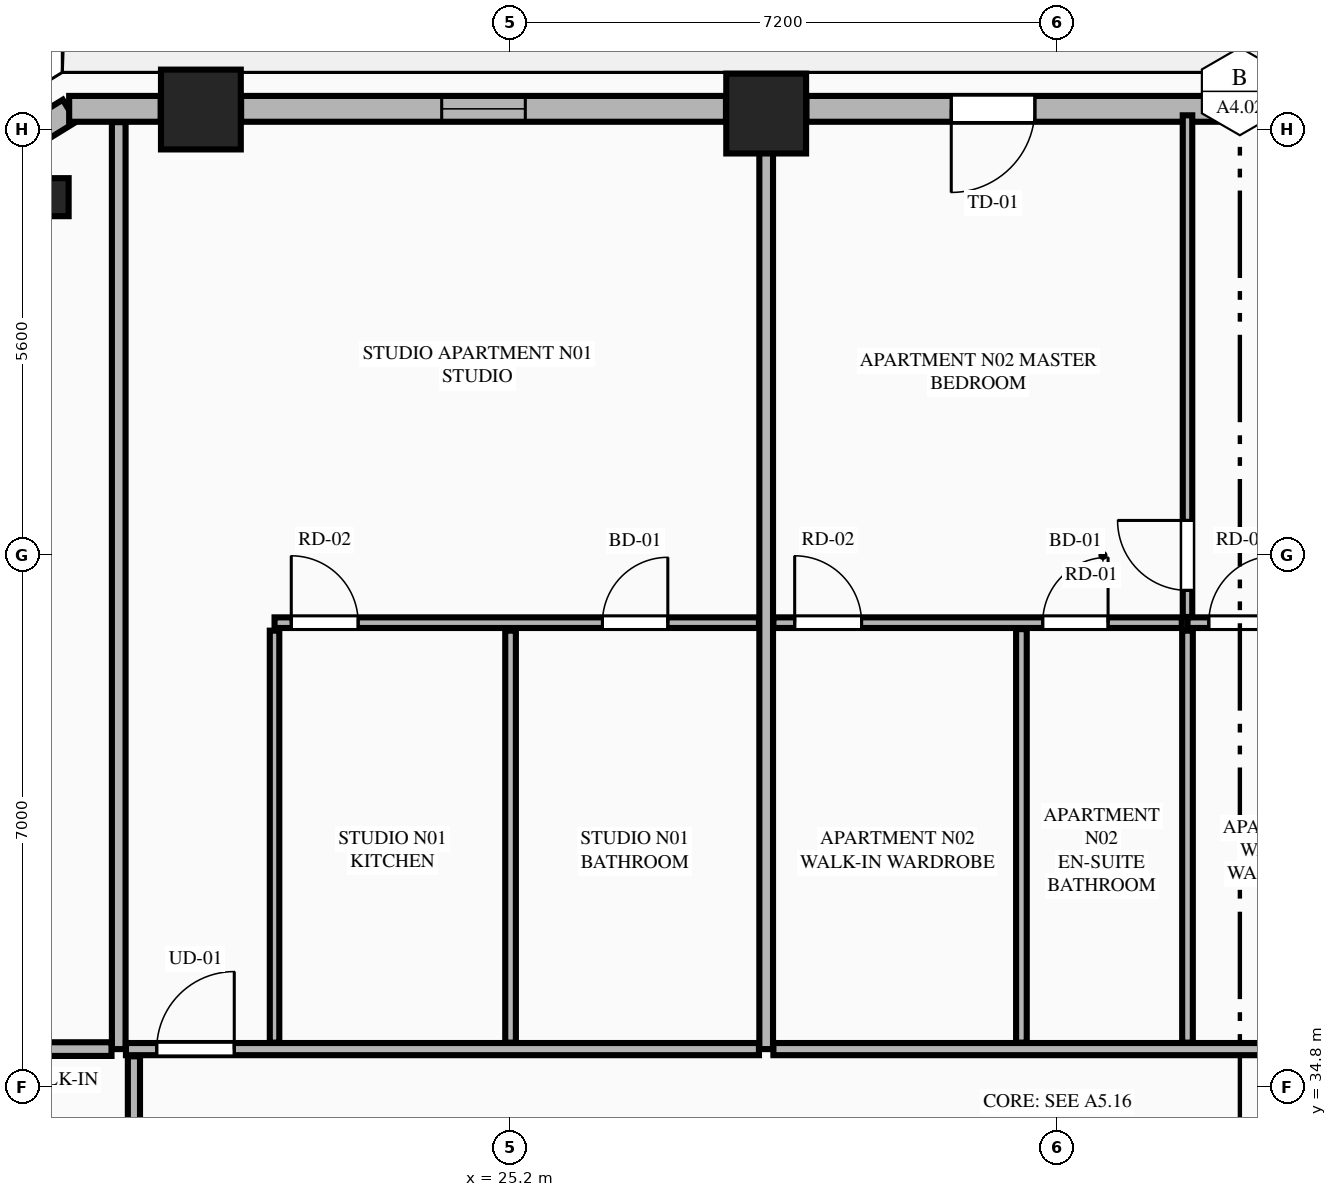
"""IFC4 building model, lengths in metres.
Left out: names, types, materials, properties, quantities, classifications, styles, units other than length and angle.
Written with IfcOpenShell. Run it as: python <this file> out.ifc"""

import sys

from ifc_helpers import new_model, si_unit, direction, frame, frame_2d, origin, origin_2d, place, context, subcontext, project, spatial, rectangle, extrude, element, fill, save


model = new_model("IFC4")
c1 = context("Model", 3, precision=1e-05, world=origin(), true_north=direction((0.0, 1.0)))
c2 = subcontext(c1, "Body", "Model", "MODEL_VIEW")
j1 = project(units=[si_unit("LENGTHUNIT", "METRE"), si_unit("PLANEANGLEUNIT", "RADIAN")], contexts=[c1])
p1 = place(None, origin())
s1 = spatial("IfcSite", under=j1, at=p1, CompositionType="ELEMENT")
p2 = place(p1, origin())
s2 = spatial("IfcBuilding", under=s1, at=p2, CompositionType="ELEMENT")
p3 = place(p2, frame((0.0, 0.0, 109.05)))
s3 = spatial("IfcBuildingStorey", under=s2, at=p3, CompositionType="ELEMENT", Elevation=109.05)
for number, where, z_axis, x_axis in (
    (1, (28.568, 47.608, 0.0), (0.0, 0.0, 1.0), (1.0, 0.0, 0.0)),
    (2, (21.131, 47.661, 0.0), (0.0, 0.0, 1.0), (1.0, 0.0, 0.0)),
):
    element("IfcColumn", number, at=place(p3, frame(where, z_axis=z_axis, x_axis=x_axis)), inside=s3, PredefinedType="COLUMN", context=c2, shape_type="SweptSolid", body=[
        extrude(rectangle(XDim=1.05, YDim=1.05, at=origin_2d()), origin(), (0.0, 0.0, 1.0), 3.55),
    ])
p4 = place(p3, frame((19.141, 46.508, 0.0), z_axis=(0.0, 0.0, 1.0), x_axis=(-0.865160173452, -0.501495637342, 0.0)))
e3 = element("IfcColumn", 3, at=p4, inside=s3, PredefinedType="PILASTER", context=c2, shape_type="SweptSolid", body=[
    extrude(rectangle(XDim=0.5, YDim=0.35, at=origin_2d()), origin(), (0.0, 0.0, 1.0), 3.55),
])
p5 = place(p3, frame((19.403, 47.645, 0.0), z_axis=(0.0, 0.0, 1.0), x_axis=(-0.851798915137, -0.523868884523, 0.0)))
e4 = element("IfcWall", 4, at=p5, inside=s3, PredefinedType="STANDARD", context=c2, shape_type="SweptSolid", body=[
    extrude(rectangle(XDim=1.848, YDim=0.34, at=frame_2d((0.924, 0.0))), origin(), (0.0, 0.0, 1.0), 3.34),
])
p6 = place(p3, frame((35.703, 47.67, 0.0), z_axis=(0.0, 0.0, 1.0), x_axis=(-1.0, 0.0, 0.0)))
e5 = element("IfcWall", 5, at=p6, inside=s3, PredefinedType="STANDARD", context=c2, shape_type="SweptSolid", body=[
    extrude(rectangle(XDim=6.606, YDim=0.34, at=frame_2d((3.303, 0.0))), origin(), (0.0, 0.0, 1.0), 2.797),
])
p7 = place(p6, frame((3.6, 0.0, 0.0)))
e6 = element("IfcOpeningElement", 6, at=p7, cuts=e5, PredefinedType="OPENING", context=c2, shape_type="SweptSolid", body=[
    extrude(rectangle(XDim=1.1, YDim=2.25, at=frame_2d((0.55, 1.125))), frame((0.0, 0.18, 0.0), z_axis=(0.0, -1.0, 0.0), x_axis=(1.0, 0.0, 0.0)), (0.0, 0.0, 1.0), 0.36),
])
p8 = place(p6, frame((0.22, 0.0, 0.75)))
e7 = element("IfcOpeningElement", 7, at=p8, cuts=e5, PredefinedType="OPENING", context=c2, shape_type="SweptSolid", body=[
    extrude(rectangle(XDim=1.04, YDim=1.897, at=frame_2d((0.52, 0.948))), frame((0.0, 0.18, 0.0), z_axis=(0.0, -1.0, 0.0), x_axis=(1.0, 0.0, 0.0)), (0.0, 0.0, 1.0), 0.36),
])
p9 = place(p3, frame((28.039, 47.67, 0.0), z_axis=(0.0, 0.0, 1.0), x_axis=(-1.0, 0.0, 0.0)))
e8 = element("IfcWall", 8, at=p9, inside=s3, PredefinedType="STANDARD", context=c2, shape_type="SweptSolid", body=[
    extrude(rectangle(XDim=6.379, YDim=0.34, at=frame_2d((3.189, 0.0))), origin(), (0.0, 0.0, 1.0), 2.797),
])
p10 = place(p9, frame((2.64, 0.0, 0.75)))
e9 = element("IfcOpeningElement", 9, at=p10, cuts=e8, PredefinedType="OPENING", context=c2, shape_type="SweptSolid", body=[
    extrude(rectangle(XDim=1.1, YDim=1.897, at=frame_2d((0.55, 0.948))), frame((0.0, 0.18, 0.0), z_axis=(0.0, -1.0, 0.0), x_axis=(1.0, 0.0, 0.0)), (0.0, 0.0, 1.0), 0.36),
])
p11 = place(p3, frame((20.602, 47.67, 0.0), z_axis=(0.0, 0.0, 1.0), x_axis=(-1.0, 0.0, 0.0)))
e10 = element("IfcWall", 10, at=p11, inside=s3, PredefinedType="STANDARD", context=c2, shape_type="SweptSolid", body=[
    extrude(rectangle(XDim=1.204, YDim=0.34, at=frame_2d((0.602, 0.0))), origin(), (0.0, 0.0, 1.0), 3.34),
])
p12 = place(p3, frame((20.05, 35.3, 0.0), z_axis=(0.0, 0.0, 1.0), x_axis=(0.0, 1.0, 0.0)))
e11 = element("IfcWall", 11, at=p12, inside=s3, PredefinedType="PARTITIONING", context=c2, shape_type="SweptSolid", body=[
    extrude(rectangle(XDim=12.195, YDim=0.18, at=frame_2d((6.098, 0.0))), origin(), (0.0, 0.0, 1.0), 3.34),
])
p13 = place(p3, frame((28.568, 35.3, 0.0), z_axis=(0.0, 0.0, 1.0), x_axis=(0.0, 1.0, 0.0)))
e12 = element("IfcWall", 12, at=p13, inside=s3, PredefinedType="PARTITIONING", context=c2, shape_type="SweptSolid", body=[
    extrude(rectangle(XDim=12.195, YDim=0.18, at=frame_2d((6.098, 0.0))), origin(), (0.0, 0.0, 1.0), 2.722),
])
p14 = place(p3, frame((20.145, 35.3, 0.0), z_axis=(0.0, 0.0, 1.0), x_axis=(1.0, 0.0, 0.0)))
e13 = element("IfcWall", 13, at=p14, inside=s3, PredefinedType="PARTITIONING", context=c2, shape_type="SweptSolid", body=[
    extrude(rectangle(XDim=8.328, YDim=0.16, at=frame_2d((4.164, 0.0))), origin(), (0.0, 0.0, 1.0), 3.34),
])
p15 = place(p14, frame((0.405, 0.0, 0.0)))
e14 = element("IfcOpeningElement", 14, at=p15, cuts=e13, PredefinedType="OPENING", context=c2, shape_type="SweptSolid", body=[
    extrude(rectangle(XDim=1.02, YDim=2.25, at=frame_2d((0.51, 1.125))), frame((0.0, 0.09, 0.0), z_axis=(0.0, -1.0, 0.0), x_axis=(1.0, 0.0, 0.0)), (0.0, 0.0, 1.0), 0.18),
])
p16 = place(p3, frame((22.1, 35.385, 0.0), z_axis=(0.0, 0.0, 1.0), x_axis=(0.0, 1.0, 0.0)))
e15 = element("IfcWall", 15, at=p16, inside=s3, PredefinedType="PARTITIONING", context=c2, shape_type="SweptSolid", body=[
    extrude(rectangle(XDim=5.42, YDim=0.125, at=frame_2d((2.71, 0.0))), origin(), (0.0, 0.0, 1.0), 2.722),
])
p17 = place(p3, frame((22.1, 40.91, 0.0), z_axis=(0.0, 0.0, 1.0), x_axis=(1.0, 0.0, 0.0)))
e16 = element("IfcWall", 16, at=p17, inside=s3, PredefinedType="PLUMBINGWALL", context=c2, shape_type="SweptSolid", body=[
    extrude(rectangle(XDim=6.373, YDim=0.14, at=frame_2d((3.187, 0.0))), origin(), (0.0, 0.0, 1.0), 3.34),
])
p18 = place(p17, frame((4.314, 0.0, 0.0)))
e17 = element("IfcOpeningElement", 17, at=p18, cuts=e16, PredefinedType="OPENING", context=c2, shape_type="SweptSolid", body=[
    extrude(rectangle(XDim=0.86, YDim=2.1, at=frame_2d((0.43, 1.05))), frame((0.0, 0.08, 0.0), z_axis=(0.0, -1.0, 0.0), x_axis=(1.0, 0.0, 0.0)), (0.0, 0.0, 1.0), 0.16),
])
p19 = place(p17, frame((0.22, 0.0, 0.0)))
e18 = element("IfcOpeningElement", 18, at=p19, cuts=e16, PredefinedType="OPENING", context=c2, shape_type="SweptSolid", body=[
    extrude(rectangle(XDim=0.88, YDim=2.15, at=frame_2d((0.44, 1.075))), frame((0.0, 0.08, 0.0), z_axis=(0.0, -1.0, 0.0), x_axis=(1.0, 0.0, 0.0)), (0.0, 0.0, 1.0), 0.16),
])
p20 = place(p3, frame((25.205, 35.385, 0.0), z_axis=(0.0, 0.0, 1.0), x_axis=(0.0, 1.0, 0.0)))
e19 = element("IfcWall", 19, at=p20, inside=s3, PredefinedType="PLUMBINGWALL", context=c2, shape_type="SweptSolid", body=[
    extrude(rectangle(XDim=5.42, YDim=0.14, at=frame_2d((2.71, 0.0))), origin(), (0.0, 0.0, 1.0), 3.34),
])
p21 = place(p3, frame((28.663, 35.3, 0.0), z_axis=(0.0, 0.0, 1.0), x_axis=(1.0, 0.0, 0.0)))
e20 = element("IfcWall", 20, at=p21, inside=s3, PredefinedType="PARTITIONING", context=c2, shape_type="SweptSolid", body=[
    extrude(rectangle(XDim=15.992, YDim=0.16, at=frame_2d((7.996, 0.0))), origin(), (0.0, 0.0, 1.0), 3.34),
])
p22 = place(p21, frame((14.087, 0.0, 0.0)))
e21 = element("IfcOpeningElement", 21, at=p22, cuts=e20, PredefinedType="OPENING", context=c2, shape_type="SweptSolid", body=[
    extrude(rectangle(XDim=1.02, YDim=2.25, at=frame_2d((0.51, 1.125))), frame((0.0, 0.09, 0.0), z_axis=(0.0, -1.0, 0.0), x_axis=(1.0, 0.0, 0.0)), (0.0, 0.0, 1.0), 0.18),
])
p23 = place(p3, frame((34.111, 40.91, 0.0), z_axis=(0.0, 0.0, 1.0), x_axis=(1.0, 0.0, 0.0)))
e22 = element("IfcWall", 22, at=p23, inside=s3, PredefinedType="PLUMBINGWALL", context=c2, shape_type="SweptSolid", body=[
    extrude(rectangle(XDim=8.389, YDim=0.14, at=frame_2d((4.194, 0.0))), origin(), (0.0, 0.0, 1.0), 3.34),
])
p24 = place(p23, frame((0.28, 0.0, 0.0)))
e23 = element("IfcOpeningElement", 23, at=p24, cuts=e22, PredefinedType="OPENING", context=c2, shape_type="SweptSolid", body=[
    extrude(rectangle(XDim=0.88, YDim=2.15, at=frame_2d((0.44, 1.075))), frame((0.0, 0.08, 0.0), z_axis=(0.0, -1.0, 0.0), x_axis=(1.0, 0.0, 0.0)), (0.0, 0.0, 1.0), 0.16),
])
p25 = place(p23, frame((2.737, 0.0, 0.0)))
e24 = element("IfcOpeningElement", 24, at=p25, cuts=e22, PredefinedType="OPENING", context=c2, shape_type="SweptSolid", body=[
    extrude(rectangle(XDim=0.86, YDim=2.1, at=frame_2d((0.43, 1.05))), frame((0.0, 0.08, 0.0), z_axis=(0.0, -1.0, 0.0), x_axis=(1.0, 0.0, 0.0)), (0.0, 0.0, 1.0), 0.16),
])
p26 = place(p23, frame((5.189, 0.0, 0.0)))
e25 = element("IfcOpeningElement", 25, at=p26, cuts=e22, PredefinedType="OPENING", context=c2, shape_type="SweptSolid", body=[
    extrude(rectangle(XDim=0.88, YDim=2.15, at=frame_2d((0.44, 1.075))), frame((0.0, 0.08, 0.0), z_axis=(0.0, -1.0, 0.0), x_axis=(1.0, 0.0, 0.0)), (0.0, 0.0, 1.0), 0.16),
])
p27 = place(p3, frame((28.663, 40.91, 0.0), z_axis=(0.0, 0.0, 1.0), x_axis=(1.0, 0.0, 0.0)))
e26 = element("IfcWall", 26, at=p27, inside=s3, PredefinedType="PLUMBINGWALL", context=c2, shape_type="SweptSolid", body=[
    extrude(rectangle(XDim=5.373, YDim=0.14, at=frame_2d((2.687, 0.0))), origin(), (0.0, 0.0, 1.0), 3.34),
])
p28 = place(p27, frame((0.28, 0.0, 0.0)))
e27 = element("IfcOpeningElement", 27, at=p28, cuts=e26, PredefinedType="OPENING", context=c2, shape_type="SweptSolid", body=[
    extrude(rectangle(XDim=0.88, YDim=2.15, at=frame_2d((0.44, 1.075))), frame((0.0, 0.08, 0.0), z_axis=(0.0, -1.0, 0.0), x_axis=(1.0, 0.0, 0.0)), (0.0, 0.0, 1.0), 0.16),
])
p29 = place(p27, frame((3.543, 0.0, 0.0)))
e28 = element("IfcOpeningElement", 28, at=p29, cuts=e26, PredefinedType="OPENING", context=c2, shape_type="SweptSolid", body=[
    extrude(rectangle(XDim=0.86, YDim=2.1, at=frame_2d((0.43, 1.05))), frame((0.0, 0.08, 0.0), z_axis=(0.0, -1.0, 0.0), x_axis=(1.0, 0.0, 0.0)), (0.0, 0.0, 1.0), 0.16),
])
p30 = place(p3, frame((34.111, 35.385, 0.0), z_axis=(0.0, 0.0, 1.0), x_axis=(0.0, 1.0, 0.0)))
e29 = element("IfcWall", 29, at=p30, inside=s3, PredefinedType="PLUMBINGWALL", context=c2, shape_type="SweptSolid", body=[
    extrude(rectangle(XDim=5.42, YDim=0.14, at=frame_2d((2.71, 0.0))), origin(), (0.0, 0.0, 1.0), 3.34),
])
p31 = place(p3, frame((34.111, 40.985, 0.0), z_axis=(0.0, 0.0, 1.0), x_axis=(0.0, 1.0, 0.0)))
e30 = element("IfcWall", 30, at=p31, inside=s3, PredefinedType="PARTITIONING", context=c2, shape_type="SweptSolid", body=[
    extrude(rectangle(XDim=6.6, YDim=0.125, at=frame_2d((3.3, 0.0))), origin(), (0.0, 0.0, 1.0), 3.34),
])
p32 = place(p31, frame((0.35, 0.0, 0.0)))
e31 = element("IfcOpeningElement", 31, at=p32, cuts=e30, PredefinedType="OPENING", context=c2, shape_type="SweptSolid", body=[
    extrude(rectangle(XDim=0.92, YDim=2.15, at=frame_2d((0.46, 1.075))), frame((0.0, 0.073, 0.0), z_axis=(0.0, -1.0, 0.0), x_axis=(1.0, 0.0, 0.0)), (0.0, 0.0, 1.0), 0.145),
])
p33 = place(p3, frame((31.926, 35.385, 0.0), z_axis=(0.0, 0.0, 1.0), x_axis=(0.0, 1.0, 0.0)))
e32 = element("IfcWall", 32, at=p33, inside=s3, PredefinedType="PLUMBINGWALL", context=c2, shape_type="SweptSolid", body=[
    extrude(rectangle(XDim=5.44, YDim=0.14, at=frame_2d((2.72, 0.0))), origin(), (0.0, 0.0, 1.0), 3.34),
])
p34 = place(p3, frame((12.286, 35.3, 0.0), z_axis=(0.0, 0.0, 1.0), x_axis=(1.0, 0.0, 0.0)))
e33 = element("IfcWall", 33, at=p34, inside=s3, PredefinedType="PARTITIONING", context=c2, shape_type="SweptSolid", body=[
    extrude(rectangle(XDim=7.669, YDim=0.18, at=frame_2d((3.834, 0.0))), origin(), (0.0, 0.0, 1.0), 3.34),
])
p35 = place(p3, frame((20.25, 16.595, 0.0), z_axis=(0.0, 0.0, 1.0), x_axis=(0.0, 1.0, 0.0)))
e34 = element("IfcWall", 34, at=p35, inside=s3, PredefinedType="PARTITIONING", context=c2, shape_type="SweptSolid", body=[
    extrude(rectangle(XDim=18.61, YDim=0.16, at=frame_2d((9.305, 0.0))), origin(), (0.0, 0.0, 1.0), 3.34),
])
p36 = place(p35, frame((0.45, 0.0, 0.0)))
e35 = element("IfcOpeningElement", 35, at=p36, cuts=e34, PredefinedType="OPENING", context=c2, shape_type="SweptSolid", body=[
    extrude(rectangle(XDim=1.02, YDim=2.25, at=frame_2d((0.51, 1.125))), frame((0.0, 0.09, 0.0), z_axis=(0.0, -1.0, 0.0), x_axis=(1.0, 0.0, 0.0)), (0.0, 0.0, 1.0), 0.18),
])
p37 = place(p7, origin())
e36 = element("IfcDoor", 36, at=p37, inside=s3, OperationType="SINGLE_SWING_RIGHT", PredefinedType="DOOR", context=c2, shape_type="SweptSolid", body=[
    extrude(rectangle(XDim=1.1, YDim=2.25, at=frame_2d((0.55, 1.125))), frame((0.0, 0.025, 0.0), z_axis=(0.0, -1.0, 0.0), x_axis=(1.0, 0.0, 0.0)), (0.0, 0.0, 1.0), 0.05),
])
fill(e6, e36)
p38 = place(p10, origin())
e37 = element("IfcWindow", 37, at=p38, inside=s3, PartitioningType="SINGLE_PANEL", PredefinedType="WINDOW", context=c2, shape_type="SweptSolid", body=[
    extrude(rectangle(XDim=1.1, YDim=1.897, at=frame_2d((0.55, 0.948))), frame((0.0, 0.03, 0.0), z_axis=(0.0, -1.0, 0.0), x_axis=(1.0, 0.0, 0.0)), (0.0, 0.0, 1.0), 0.06),
])
fill(e9, e37)
p39 = place(p18, origin())
e38 = element("IfcDoor", 38, at=p39, inside=s3, OperationType="SINGLE_SWING_RIGHT", PredefinedType="DOOR", context=c2, shape_type="SweptSolid", body=[
    extrude(rectangle(XDim=0.86, YDim=2.1, at=frame_2d((0.43, 1.05))), frame((0.0, 0.025, 0.0), z_axis=(0.0, -1.0, 0.0), x_axis=(1.0, 0.0, 0.0)), (0.0, 0.0, 1.0), 0.05),
])
fill(e17, e38)
p40 = place(p15, origin())
e39 = element("IfcDoor", 39, at=p40, inside=s3, OperationType="SINGLE_SWING_RIGHT", PredefinedType="DOOR", context=c2, shape_type="SweptSolid", body=[
    extrude(rectangle(XDim=1.02, YDim=2.25, at=frame_2d((0.51, 1.125))), frame((0.0, 0.025, 0.0), z_axis=(0.0, -1.0, 0.0), x_axis=(1.0, 0.0, 0.0)), (0.0, 0.0, 1.0), 0.05),
])
fill(e14, e39)
p41 = place(p19, origin())
e40 = element("IfcDoor", 40, at=p41, inside=s3, OperationType="SINGLE_SWING_LEFT", PredefinedType="DOOR", context=c2, shape_type="SweptSolid", body=[
    extrude(rectangle(XDim=0.88, YDim=2.15, at=frame_2d((0.44, 1.075))), frame((0.0, 0.025, 0.0), z_axis=(0.0, -1.0, 0.0), x_axis=(1.0, 0.0, 0.0)), (0.0, 0.0, 1.0), 0.05),
])
fill(e18, e40)
p42 = place(p24, origin())
e41 = element("IfcDoor", 41, at=p42, inside=s3, OperationType="SINGLE_SWING_RIGHT", PredefinedType="DOOR", context=c2, shape_type="SweptSolid", body=[
    extrude(rectangle(XDim=0.88, YDim=2.15, at=frame_2d((0.44, 1.075))), frame((0.0, 0.025, 0.0), z_axis=(0.0, -1.0, 0.0), x_axis=(1.0, 0.0, 0.0)), (0.0, 0.0, 1.0), 0.05),
])
fill(e23, e41)
p43 = place(p28, origin())
e42 = element("IfcDoor", 42, at=p43, inside=s3, OperationType="SINGLE_SWING_LEFT", PredefinedType="DOOR", context=c2, shape_type="SweptSolid", body=[
    extrude(rectangle(XDim=0.88, YDim=2.15, at=frame_2d((0.44, 1.075))), frame((0.0, 0.025, 0.0), z_axis=(0.0, -1.0, 0.0), x_axis=(1.0, 0.0, 0.0)), (0.0, 0.0, 1.0), 0.05),
])
fill(e27, e42)
p44 = place(p29, origin())
e43 = element("IfcDoor", 43, at=p44, inside=s3, OperationType="SINGLE_SWING_RIGHT", PredefinedType="DOOR", context=c2, shape_type="SweptSolid", body=[
    extrude(rectangle(XDim=0.86, YDim=2.1, at=frame_2d((0.43, 1.05))), frame((0.0, 0.025, 0.0), z_axis=(0.0, -1.0, 0.0), x_axis=(1.0, 0.0, 0.0)), (0.0, 0.0, 1.0), 0.05),
])
fill(e28, e43)
p45 = place(p32, origin())
e44 = element("IfcDoor", 44, at=p45, inside=s3, OperationType="SINGLE_SWING_RIGHT", PredefinedType="DOOR", context=c2, shape_type="SweptSolid", body=[
    extrude(rectangle(XDim=0.92, YDim=2.15, at=frame_2d((0.46, 1.075))), frame((0.0, 0.025, 0.0), z_axis=(0.0, -1.0, 0.0), x_axis=(1.0, 0.0, 0.0)), (0.0, 0.0, 1.0), 0.05),
])
fill(e31, e44)
p46 = place(p8, origin())
e45 = element("IfcWindow", 45, at=p46, inside=s3, PartitioningType="SINGLE_PANEL", PredefinedType="WINDOW", context=c2, shape_type="SweptSolid", body=[
    extrude(rectangle(XDim=1.04, YDim=1.897, at=frame_2d((0.52, 0.948))), frame((0.0, 0.03, 0.0), z_axis=(0.0, -1.0, 0.0), x_axis=(1.0, 0.0, 0.0)), (0.0, 0.0, 1.0), 0.06),
])
fill(e7, e45)
save(model, sys.argv[1])
